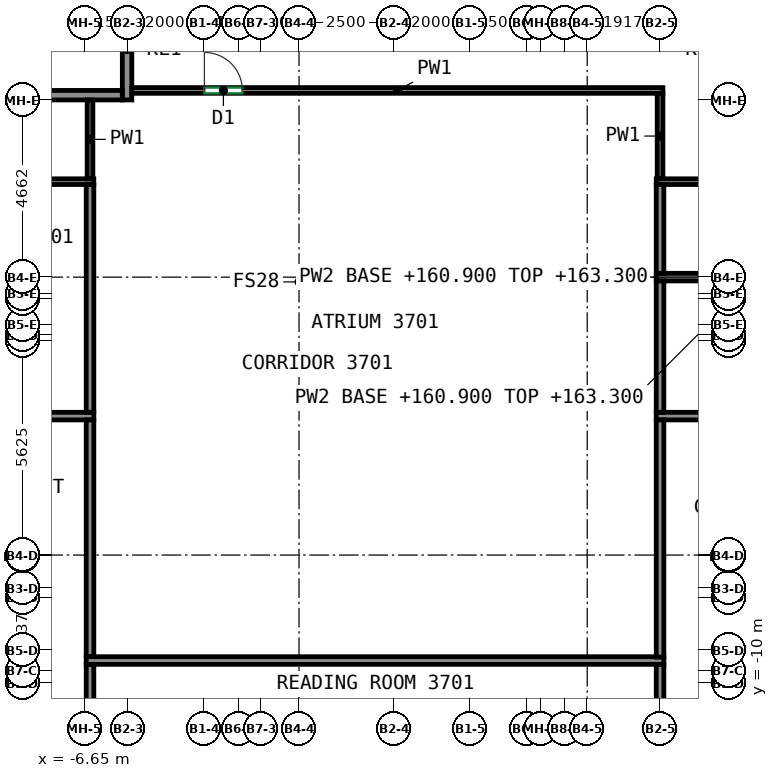
"""IFC4 building model, lengths in metres.
Left out: names, types, materials, properties, quantities, classifications, styles, units other than length and angle.
Written with IfcOpenShell. Run it as: python <this file> out.ifc"""

import sys

from ifc_helpers import new_model, si_unit, direction, frame, frame_2d, origin, place, context, subcontext, project, spatial, rectangle, extrude, source, transform, mapped, element, fill, save


model = new_model("IFC4")
c1 = context("Model", 3, precision=1e-05, world=origin(), true_north=direction((0.0, 1.0)))
c2 = subcontext(c1, "Body", "Model", "MODEL_VIEW")
j1 = project(units=[si_unit("LENGTHUNIT", "METRE"), si_unit("PLANEANGLEUNIT", "RADIAN")], contexts=[c1])
p1 = place(None, origin())
s1 = spatial("IfcSite", under=j1, at=p1, CompositionType="ELEMENT")
p2 = place(p1, origin())
s2 = spatial("IfcBuilding", under=s1, at=p2, CompositionType="ELEMENT")
p3 = place(p2, frame((0.0, 0.0, 160.9)))
s3 = spatial("IfcBuildingStorey", under=s2, at=p3, CompositionType="ELEMENT", Elevation=160.9)
m1 = source(origin(), c2, "Body", "SweptSolid", [
    extrude(rectangle(XDim=2.65, YDim=0.25, at=frame_2d((1.325, 0.0))), origin(), (0.0, 0.0, 1.0), 3.0),
])
p4 = place(p3, frame((-5.525, 5.35, 0.0), z_axis=(0.0, 0.0, 1.0), x_axis=(0.0, 1.0, 0.0)))
e1 = element("IfcWall", 1, at=p4, inside=s3, PredefinedType="PARTITIONING", context=c2, shape_type="MappedRepresentation", body=[
    mapped(m1, transform((0.0, 0.0, 0.0))),
])
m2 = source(origin(), c2, "Body", "SweptSolid", [
    extrude(rectangle(XDim=5.36, YDim=0.25, at=frame_2d((2.68, 0.0))), origin(), (0.0, 0.0, 1.0), 3.0),
])
p5 = place(p3, frame((-11.01, 5.475, 0.0), z_axis=(0.0, 0.0, 1.0), x_axis=(1.0, 0.0, 0.0)))
e2 = element("IfcWall", 2, at=p5, inside=s3, PredefinedType="PARTITIONING", context=c2, shape_type="MappedRepresentation", body=[
    mapped(m2, transform((0.0, 0.0, 0.0))),
])
p6 = place(p5, frame((2.28, 0.0, 0.0)))
e3 = element("IfcOpeningElement", 3, at=p6, cuts=e2, PredefinedType="OPENING", context=c2, shape_type="SweptSolid", body=[
    extrude(rectangle(XDim=0.8, YDim=2.0, at=frame_2d((0.4, 1.0))), frame((0.0, 0.135, 0.0), z_axis=(0.0, -1.0, 0.0), x_axis=(1.0, 0.0, 0.0)), (0.0, 0.0, 1.0), 0.27),
])
p7 = place(p3, frame((-12.075, 3.2, 0.0), z_axis=(0.0, 0.0, 1.0), x_axis=(1.0, 0.0, 0.0)))
e4 = element("IfcWall", 4, at=p7, inside=s3, PredefinedType="PARTITIONING", context=c2, shape_type="SweptSolid", body=[
    extrude(rectangle(XDim=5.675, YDim=0.15, at=frame_2d((2.837, 0.0))), origin(), (0.0, 0.0, 1.0), 3.0),
])
p8 = place(p3, frame((8.4, 3.2, 0.0), z_axis=(0.0, 0.0, 1.0), x_axis=(1.0, 0.0, 0.0)))
e5 = element("IfcWall", 5, at=p8, inside=s3, PredefinedType="PARTITIONING", context=c2, shape_type="SweptSolid", body=[
    extrude(rectangle(XDim=7.875, YDim=0.15, at=frame_2d((3.938, 0.0))), origin(), (0.0, 0.0, 1.0), 3.0),
])
p9 = place(p8, frame((5.055, 0.0, 0.0)))
e6 = element("IfcOpeningElement", 6, at=p9, cuts=e5, PredefinedType="OPENING", context=c2, shape_type="SweptSolid", body=[
    extrude(rectangle(XDim=0.9, YDim=2.1, at=frame_2d((0.45, 1.05))), frame((0.0, 0.085, 0.0), z_axis=(0.0, -1.0, 0.0), x_axis=(1.0, 0.0, 0.0)), (0.0, 0.0, 1.0), 0.17),
])
p10 = place(p3, frame((-6.5, 3.275, 0.0), z_axis=(0.0, 0.0, 1.0), x_axis=(0.0, 1.0, 0.0)))
e7 = element("IfcWall", 7, at=p10, inside=s3, PredefinedType="PARTITIONING", context=c2, shape_type="SweptSolid", body=[
    extrude(rectangle(XDim=2.075, YDim=0.15, at=frame_2d((1.038, 0.0))), origin(), (0.0, 0.0, 1.0), 3.0),
])
p11 = place(p3, frame((8.5, 5.525, 0.0), z_axis=(0.0, 0.0, 1.0), x_axis=(0.0, -1.0, 0.0)))
e8 = element("IfcWall", 8, at=p11, inside=s3, PredefinedType="PARTITIONING", context=c2, shape_type="SweptSolid", body=[
    extrude(rectangle(XDim=2.25, YDim=0.15, at=frame_2d((1.125, 0.0))), origin(), (0.0, 0.0, 1.0), 3.0),
])
p12 = place(p3, frame((-5.4, 5.6, 0.0), z_axis=(0.0, 0.0, 1.0), x_axis=(1.0, 0.0, 0.0)))
e9 = element("IfcWall", 9, at=p12, inside=s3, PredefinedType="PARTITIONING", context=c2, shape_type="SweptSolid", body=[
    extrude(rectangle(XDim=13.975, YDim=0.15, at=frame_2d((6.987, 0.0))), origin(), (0.0, 0.0, 1.0), 3.0),
])
p13 = place(p12, frame((1.91, 0.0, 0.0)))
e10 = element("IfcOpeningElement", 10, at=p13, cuts=e9, PredefinedType="OPENING", context=c2, shape_type="SweptSolid", body=[
    extrude(rectangle(XDim=1.0, YDim=2.1, at=frame_2d((0.5, 1.05))), frame((0.0, 0.085, 0.0), z_axis=(0.0, -1.0, 0.0), x_axis=(1.0, 0.0, 0.0)), (0.0, 0.0, 1.0), 0.17),
])
p14 = place(p3, frame((-12.073, -2.969, 0.0), z_axis=(0.0, 0.0, 1.0), x_axis=(1.0, 0.0, 0.0)))
e11 = element("IfcWall", 11, at=p14, inside=s3, PredefinedType="PARTITIONING", context=c2, shape_type="SweptSolid", body=[
    extrude(rectangle(XDim=5.673, YDim=0.2, at=frame_2d((2.836, 0.0))), origin(), (0.0, 0.0, 1.0), 3.0),
])
p15 = place(p3, frame((-6.5, -11.423, 0.0), z_axis=(0.0, 0.0, 1.0), x_axis=(0.0, 1.0, 0.0)))
e12 = element("IfcWall", 12, at=p15, inside=s3, PredefinedType="PARTITIONING", context=c2, shape_type="SweptSolid", body=[
    extrude(rectangle(XDim=1.923, YDim=0.2, at=frame_2d((0.961, 0.0))), origin(), (0.0, 0.0, 1.0), 3.0),
])
p16 = place(p3, frame((-6.5, -9.3, 0.0), z_axis=(0.0, 0.0, 1.0), x_axis=(0.0, 1.0, 0.0)))
e13 = element("IfcWall", 13, at=p16, inside=s3, PredefinedType="PARTITIONING", context=c2, shape_type="SweptSolid", body=[
    extrude(rectangle(XDim=6.231, YDim=0.2, at=frame_2d((3.115, 0.0))), origin(), (0.0, 0.0, 1.0), 3.0),
])
p17 = place(p3, frame((-6.5, -2.869, 0.0), z_axis=(0.0, 0.0, 1.0), x_axis=(0.0, 1.0, 0.0)))
e14 = element("IfcWall", 14, at=p17, inside=s3, PredefinedType="PARTITIONING", context=c2, shape_type="SweptSolid", body=[
    extrude(rectangle(XDim=5.992, YDim=0.2, at=frame_2d((2.996, 0.0))), origin(), (0.0, 0.0, 1.0), 3.0),
])
p18 = place(p3, frame((8.5, -11.423, 0.0), z_axis=(0.0, 0.0, 1.0), x_axis=(0.0, 1.0, 0.0)))
e15 = element("IfcWall", 15, at=p18, inside=s3, PredefinedType="PARTITIONING", context=c2, shape_type="SweptSolid", body=[
    extrude(rectangle(XDim=1.923, YDim=0.2, at=frame_2d((0.961, 0.0))), origin(), (0.0, 0.0, 1.0), 3.0),
])
p19 = place(p3, frame((8.6, -9.4, 0.0), z_axis=(0.0, 0.0, 1.0), x_axis=(-1.0, 0.0, 0.0)))
e16 = element("IfcWall", 16, at=p19, inside=s3, PredefinedType="PARTITIONING", context=c2, shape_type="SweptSolid", body=[
    extrude(rectangle(XDim=15.2, YDim=0.2, at=frame_2d((7.6, 0.0))), origin(), (0.0, 0.0, 1.0), 3.0),
])
p20 = place(p3, frame((8.4, -2.969, 0.0), z_axis=(0.0, 0.0, 1.0), x_axis=(1.0, 0.0, 0.0)))
e17 = element("IfcWall", 17, at=p20, inside=s3, PredefinedType="PARTITIONING", context=c2, shape_type="SweptSolid", body=[
    extrude(rectangle(XDim=7.873, YDim=0.2, at=frame_2d((3.937, 0.0))), origin(), (0.0, 0.0, 1.0), 3.0),
])
p21 = place(p3, frame((8.5, -9.31, 0.0), z_axis=(0.0, 0.0, 1.0), x_axis=(0.0, 1.0, 0.0)))
e18 = element("IfcWall", 18, at=p21, inside=s3, PredefinedType="PARTITIONING", context=c2, shape_type="SweptSolid", body=[
    extrude(rectangle(XDim=6.241, YDim=0.2, at=frame_2d((3.121, 0.0))), origin(), (0.0, 0.0, 1.0), 3.0),
])
p22 = place(p3, frame((8.4, 0.688, 0.0), z_axis=(0.0, 0.0, 1.0), x_axis=(1.0, 0.0, 0.0)))
e19 = element("IfcWall", 19, at=p22, inside=s3, PredefinedType="PARTITIONING", context=c2, shape_type="SweptSolid", body=[
    extrude(rectangle(XDim=5.217, YDim=0.2, at=frame_2d((2.608, 0.0))), origin(), (0.0, 0.0, 1.0), 2.4),
])
p23 = place(p3, frame((8.5, -2.869, 0.0), z_axis=(0.0, 0.0, 1.0), x_axis=(0.0, 1.0, 0.0)))
e20 = element("IfcWall", 20, at=p23, inside=s3, PredefinedType="PARTITIONING", context=c2, shape_type="SweptSolid", body=[
    extrude(rectangle(XDim=3.457, YDim=0.2, at=frame_2d((1.729, 0.0))), origin(), (0.0, 0.0, 1.0), 3.0),
])
p24 = place(p3, frame((8.5, 0.788, 0.0), z_axis=(0.0, 0.0, 1.0), x_axis=(0.0, 1.0, 0.0)))
e21 = element("IfcWall", 21, at=p24, inside=s3, PredefinedType="PARTITIONING", context=c2, shape_type="SweptSolid", body=[
    extrude(rectangle(XDim=2.335, YDim=0.2, at=frame_2d((1.167, 0.0))), origin(), (0.0, 0.0, 1.0), 3.0),
])
p25 = place(p13, origin())
e22 = element("IfcDoor", 22, at=p25, inside=s3, OperationType="SINGLE_SWING_LEFT", PredefinedType="DOOR", context=c2, shape_type="SweptSolid", body=[
    extrude(rectangle(XDim=1.0, YDim=2.1, at=frame_2d((0.5, 1.05))), frame((0.0, 0.025, 0.0), z_axis=(0.0, -1.0, 0.0), x_axis=(1.0, 0.0, 0.0)), (0.0, 0.0, 1.0), 0.05),
])
fill(e10, e22)
save(model, sys.argv[1])
